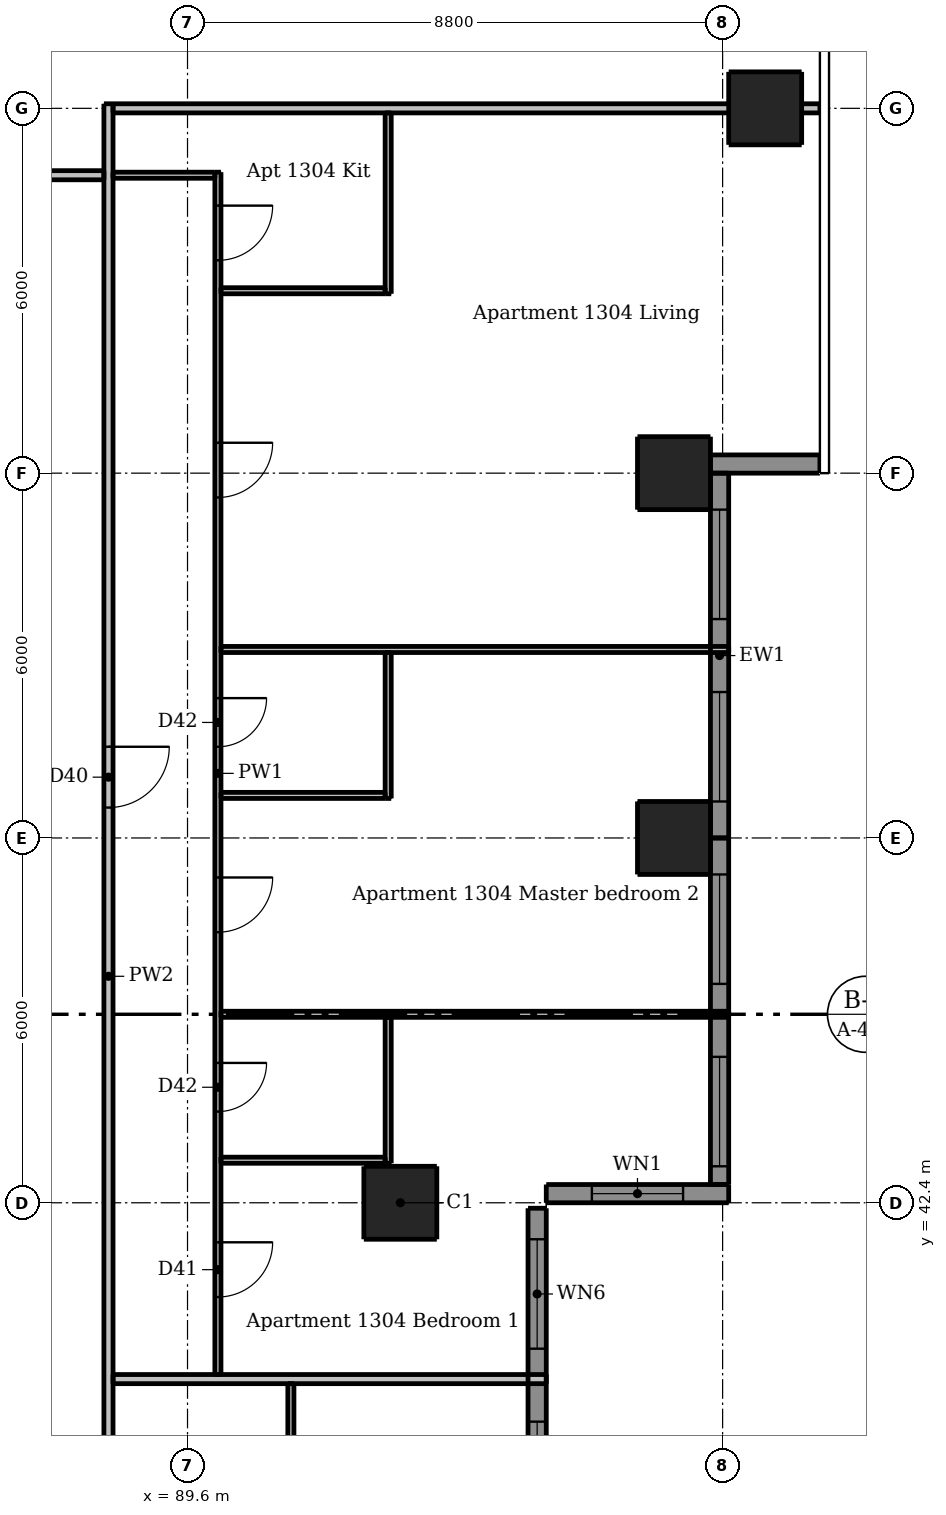
"""IFC4 building model, lengths in metres.
Left out: names, types, materials, properties, quantities, classifications, styles, units other than length and angle.
Written with IfcOpenShell. Run it as: python <this file> out.ifc"""

import sys

from ifc_helpers import new_model, si_unit, direction, frame, frame_2d, origin, origin_2d, place, context, subcontext, project, spatial, rectangle, extrude, element, fill, save


model = new_model("IFC4")
c1 = context("Model", 3, precision=1e-05, world=origin(), true_north=direction((0.0, 1.0)))
c2 = subcontext(c1, "Body", "Model", "MODEL_VIEW")
j1 = project(units=[si_unit("LENGTHUNIT", "METRE"), si_unit("PLANEANGLEUNIT", "RADIAN")], contexts=[c1])
p1 = place(None, origin())
s1 = spatial("IfcSite", under=j1, at=p1, CompositionType="ELEMENT")
p2 = place(p1, origin())
s2 = spatial("IfcBuilding", under=s1, at=p2, CompositionType="ELEMENT")
p3 = place(p2, frame((0.0, 0.0, 49.9)))
s3 = spatial("IfcBuildingStorey", under=s2, at=p3, CompositionType="ELEMENT", Elevation=49.9)
p4 = place(p3, frame((93.1, 42.4, 0.0), z_axis=(0.0, 0.0, 1.0), x_axis=(1.0, 0.0, 0.0)))
e1 = element("IfcColumn", 1, at=p4, inside=s3, PredefinedType="COLUMN", context=c2, shape_type="SweptSolid", body=[
    extrude(rectangle(XDim=1.2, YDim=1.2, at=origin_2d()), origin(), (0.0, 0.0, 1.0), 3.05),
])
p5 = place(p3, frame((97.6, 48.4, 0.0), z_axis=(0.0, 0.0, 1.0), x_axis=(1.0, 0.0, 0.0)))
e2 = element("IfcColumn", 2, at=p5, inside=s3, PredefinedType="COLUMN", context=c2, shape_type="SweptSolid", body=[
    extrude(rectangle(XDim=1.2, YDim=1.2, at=origin_2d()), origin(), (0.0, 0.0, 1.0), 3.3),
])
for number, where, z_axis, x_axis in (
    (3, (97.6, 54.4, 0.0), (0.0, 0.0, 1.0), (1.0, 0.0, 0.0)),
    (4, (99.1, 60.4, 0.0), (0.0, 0.0, 1.0), (1.0, 0.0, 0.0)),
):
    element("IfcColumn", number, at=place(p3, frame(where, z_axis=z_axis, x_axis=x_axis)), inside=s3, PredefinedType="COLUMN", context=c2, shape_type="SweptSolid", body=[
        extrude(rectangle(XDim=1.2, YDim=1.2, at=origin_2d()), origin(), (0.0, 0.0, 1.0), 3.05),
    ])
p6 = place(p3, frame((95.5, 42.55, 0.0), z_axis=(0.0, 0.0, 1.0), x_axis=(1.0, 0.0, 0.0)))
e5 = element("IfcWall", 5, at=p6, inside=s3, PredefinedType="SOLIDWALL", context=c2, shape_type="SweptSolid", body=[
    extrude(rectangle(XDim=3.0, YDim=0.3, at=frame_2d((1.5, 0.0))), origin(), (0.0, 0.0, 1.0), 3.05),
])
p7 = place(p6, frame((0.75, 0.0, 0.9)))
e6 = element("IfcOpeningElement", 6, at=p7, cuts=e5, PredefinedType="OPENING", context=c2, shape_type="SweptSolid", body=[
    extrude(rectangle(XDim=1.5, YDim=1.5, at=frame_2d((0.75, 0.75))), frame((0.0, 0.16, 0.0), z_axis=(0.0, -1.0, 0.0), x_axis=(1.0, 0.0, 0.0)), (0.0, 0.0, 1.0), 0.32),
])
p8 = place(p3, frame((98.2, 54.55, 0.0), z_axis=(0.0, 0.0, 1.0), x_axis=(1.0, 0.0, 0.0)))
e7 = element("IfcWall", 7, at=p8, inside=s3, PredefinedType="SOLIDWALL", context=c2, shape_type="SweptSolid", body=[
    extrude(rectangle(XDim=1.8, YDim=0.3, at=frame_2d((0.9, 0.0))), origin(), (0.0, 0.0, 1.0), 3.05),
])
p9 = place(p3, frame((95.35, 36.7, 0.0), z_axis=(0.0, 0.0, 1.0), x_axis=(0.0, 1.0, 0.0)))
e8 = element("IfcWall", 8, at=p9, inside=s3, PredefinedType="SOLIDWALL", context=c2, shape_type="SweptSolid", body=[
    extrude(rectangle(XDim=5.61, YDim=0.3, at=frame_2d((2.805, 0.0))), origin(), (0.0, 0.0, 1.0), 3.05),
])
p10 = place(p9, frame((0.3, 0.0, 0.15)))
e9 = element("IfcOpeningElement", 9, at=p10, cuts=e8, PredefinedType="OPENING", context=c2, shape_type="SweptSolid", body=[
    extrude(rectangle(XDim=1.8, YDim=2.1, at=frame_2d((0.9, 1.05))), frame((0.0, 0.16, 0.0), z_axis=(0.0, -1.0, 0.0), x_axis=(1.0, 0.0, 0.0)), (0.0, 0.0, 1.0), 0.32),
])
p11 = place(p9, frame((3.3, 0.0, 0.15)))
e10 = element("IfcOpeningElement", 10, at=p11, cuts=e8, PredefinedType="OPENING", context=c2, shape_type="SweptSolid", body=[
    extrude(rectangle(XDim=1.8, YDim=2.1, at=frame_2d((0.9, 1.05))), frame((0.0, 0.16, 0.0), z_axis=(0.0, -1.0, 0.0), x_axis=(1.0, 0.0, 0.0)), (0.0, 0.0, 1.0), 0.32),
])
p12 = place(p3, frame((98.35, 42.7, 0.0), z_axis=(0.0, 0.0, 1.0), x_axis=(0.0, 1.0, 0.0)))
e11 = element("IfcWall", 11, at=p12, inside=s3, PredefinedType="SOLIDWALL", context=c2, shape_type="SweptSolid", body=[
    extrude(rectangle(XDim=5.7, YDim=0.3, at=frame_2d((2.85, 0.0))), origin(), (0.0, 0.0, 1.0), 3.05),
])
p13 = place(p12, frame((0.3, 0.0, 0.15)))
e12 = element("IfcOpeningElement", 12, at=p13, cuts=e11, PredefinedType="OPENING", context=c2, shape_type="SweptSolid", body=[
    extrude(rectangle(XDim=1.8, YDim=2.1, at=frame_2d((0.9, 1.05))), frame((0.0, 0.16, 0.0), z_axis=(0.0, -1.0, 0.0), x_axis=(1.0, 0.0, 0.0)), (0.0, 0.0, 1.0), 0.32),
])
p14 = place(p12, frame((3.3, 0.0, 0.15)))
e13 = element("IfcOpeningElement", 13, at=p14, cuts=e11, PredefinedType="OPENING", context=c2, shape_type="SweptSolid", body=[
    extrude(rectangle(XDim=1.8, YDim=2.1, at=frame_2d((0.9, 1.05))), frame((0.0, 0.16, 0.0), z_axis=(0.0, -1.0, 0.0), x_axis=(1.0, 0.0, 0.0)), (0.0, 0.0, 1.0), 0.32),
])
p15 = place(p3, frame((98.35, 48.4, 0.0), z_axis=(0.0, 0.0, 1.0), x_axis=(0.0, 1.0, 0.0)))
e14 = element("IfcWall", 14, at=p15, inside=s3, PredefinedType="SOLIDWALL", context=c2, shape_type="SweptSolid", body=[
    extrude(rectangle(XDim=6.0, YDim=0.3, at=frame_2d((3.0, 0.0))), origin(), (0.0, 0.0, 1.0), 3.05),
])
p16 = place(p15, frame((0.6, 0.0, 0.15)))
e15 = element("IfcOpeningElement", 15, at=p16, cuts=e14, PredefinedType="OPENING", context=c2, shape_type="SweptSolid", body=[
    extrude(rectangle(XDim=1.8, YDim=2.1, at=frame_2d((0.9, 1.05))), frame((0.0, 0.16, 0.0), z_axis=(0.0, -1.0, 0.0), x_axis=(1.0, 0.0, 0.0)), (0.0, 0.0, 1.0), 0.32),
])
p17 = place(p15, frame((3.6, 0.0, 0.15)))
e16 = element("IfcOpeningElement", 16, at=p17, cuts=e14, PredefinedType="OPENING", context=c2, shape_type="SweptSolid", body=[
    extrude(rectangle(XDim=1.8, YDim=2.1, at=frame_2d((0.9, 1.05))), frame((0.0, 0.16, 0.0), z_axis=(0.0, -1.0, 0.0), x_axis=(1.0, 0.0, 0.0)), (0.0, 0.0, 1.0), 0.32),
])
p18 = place(p3, frame((90.1, 59.35, 0.0), z_axis=(0.0, 0.0, 1.0), x_axis=(0.0, -1.0, 0.0)))
e17 = element("IfcWall", 17, at=p18, inside=s3, PredefinedType="PARTITIONING", context=c2, shape_type="SweptSolid", body=[
    extrude(rectangle(XDim=19.775, YDim=0.1, at=frame_2d((9.888, 0.0))), origin(), (0.0, 0.0, 1.0), 3.05),
])
p19 = place(p18, frame((4.45, 0.0, 0.0)))
e18 = element("IfcOpeningElement", 18, at=p19, cuts=e17, PredefinedType="OPENING", context=c2, shape_type="SweptSolid", body=[
    extrude(rectangle(XDim=0.9, YDim=2.1, at=frame_2d((0.45, 1.05))), frame((0.0, 0.06, 0.0), z_axis=(0.0, -1.0, 0.0), x_axis=(1.0, 0.0, 0.0)), (0.0, 0.0, 1.0), 0.12),
])
p20 = place(p18, frame((0.55, 0.0, 0.0)))
e19 = element("IfcOpeningElement", 19, at=p20, cuts=e17, PredefinedType="OPENING", context=c2, shape_type="SweptSolid", body=[
    extrude(rectangle(XDim=0.9, YDim=2.1, at=frame_2d((0.45, 1.05))), frame((0.0, 0.06, 0.0), z_axis=(0.0, -1.0, 0.0), x_axis=(1.0, 0.0, 0.0)), (0.0, 0.0, 1.0), 0.12),
])
p21 = place(p18, frame((17.6, 0.0, 0.0)))
e20 = element("IfcOpeningElement", 20, at=p21, cuts=e17, PredefinedType="OPENING", context=c2, shape_type="SweptSolid", body=[
    extrude(rectangle(XDim=0.9, YDim=2.1, at=frame_2d((0.45, 1.05))), frame((0.0, 0.06, 0.0), z_axis=(0.0, -1.0, 0.0), x_axis=(1.0, 0.0, 0.0)), (0.0, 0.0, 1.0), 0.12),
])
p22 = place(p18, frame((11.6, 0.0, 0.0)))
e21 = element("IfcOpeningElement", 21, at=p22, cuts=e17, PredefinedType="OPENING", context=c2, shape_type="SweptSolid", body=[
    extrude(rectangle(XDim=0.9, YDim=2.1, at=frame_2d((0.45, 1.05))), frame((0.0, 0.06, 0.0), z_axis=(0.0, -1.0, 0.0), x_axis=(1.0, 0.0, 0.0)), (0.0, 0.0, 1.0), 0.12),
])
p23 = place(p18, frame((14.65, 0.0, 0.0)))
e22 = element("IfcOpeningElement", 22, at=p23, cuts=e17, PredefinedType="OPENING", context=c2, shape_type="SweptSolid", body=[
    extrude(rectangle(XDim=0.8, YDim=2.1, at=frame_2d((0.4, 1.05))), frame((0.0, 0.06, 0.0), z_axis=(0.0, -1.0, 0.0), x_axis=(1.0, 0.0, 0.0)), (0.0, 0.0, 1.0), 0.12),
])
p24 = place(p18, frame((8.65, 0.0, 0.0)))
e23 = element("IfcOpeningElement", 23, at=p24, cuts=e17, PredefinedType="OPENING", context=c2, shape_type="SweptSolid", body=[
    extrude(rectangle(XDim=0.8, YDim=2.1, at=frame_2d((0.4, 1.05))), frame((0.0, 0.06, 0.0), z_axis=(0.0, -1.0, 0.0), x_axis=(1.0, 0.0, 0.0)), (0.0, 0.0, 1.0), 0.12),
])
p25 = place(p3, frame((91.3, 33.45, 0.0), z_axis=(0.0, 0.0, 1.0), x_axis=(0.0, 1.0, 0.0)))
e24 = element("IfcWall", 24, at=p25, inside=s3, PredefinedType="PARTITIONING", context=c2, shape_type="SweptSolid", body=[
    extrude(rectangle(XDim=5.975, YDim=0.1, at=frame_2d((2.988, 0.0))), origin(), (0.0, 0.0, 1.0), 3.05),
])
p26 = place(p25, frame((3.8, 0.0, 0.0)))
e25 = element("IfcOpeningElement", 25, at=p26, cuts=e24, PredefinedType="OPENING", context=c2, shape_type="SweptSolid", body=[
    extrude(rectangle(XDim=0.8, YDim=2.1, at=frame_2d((0.4, 1.05))), frame((0.0, 0.06, 0.0), z_axis=(0.0, -1.0, 0.0), x_axis=(1.0, 0.0, 0.0)), (0.0, 0.0, 1.0), 0.12),
])
for number, where, z_axis, x_axis in (
    (26, (92.9, 43.05, 0.0), (0.0, 0.0, 1.0), (0.0, 1.0, 0.0)),
    (27, (92.9, 49.05, 0.0), (0.0, 0.0, 1.0), (0.0, 1.0, 0.0)),
):
    element("IfcWall", number, at=place(p3, frame(where, z_axis=z_axis, x_axis=x_axis)), inside=s3, PredefinedType="PARTITIONING", context=c2, shape_type="SweptSolid", body=[
        extrude(rectangle(XDim=2.4, YDim=0.1, at=frame_2d((1.2, 0.0))), origin(), (0.0, 0.0, 1.0), 3.05),
    ])
p27 = place(p3, frame((92.9, 57.35, 0.0), z_axis=(0.0, 0.0, 1.0), x_axis=(0.0, 1.0, 0.0)))
e28 = element("IfcWall", 28, at=p27, inside=s3, PredefinedType="PARTITIONING", context=c2, shape_type="SweptSolid", body=[
    extrude(rectangle(XDim=2.975, YDim=0.1, at=frame_2d((1.487, 0.0))), origin(), (0.0, 0.0, 1.0), 3.05),
])
p28 = place(p3, frame((88.375, 59.3, 0.0), z_axis=(0.0, 0.0, 1.0), x_axis=(1.0, 0.0, 0.0)))
e29 = element("IfcWall", 29, at=p28, inside=s3, PredefinedType="PARTITIONING", context=c2, shape_type="SweptSolid", body=[
    extrude(rectangle(XDim=1.675, YDim=0.1, at=frame_2d((0.837, 0.0))), origin(), (0.0, 0.0, 1.0), 3.05),
])
p29 = place(p3, frame((90.15, 57.4, 0.0), z_axis=(0.0, 0.0, 1.0), x_axis=(1.0, 0.0, 0.0)))
e30 = element("IfcWall", 30, at=p29, inside=s3, PredefinedType="PARTITIONING", context=c2, shape_type="SweptSolid", body=[
    extrude(rectangle(XDim=2.7, YDim=0.1, at=frame_2d((1.35, 0.0))), origin(), (0.0, 0.0, 1.0), 3.05),
])
p30 = place(p3, frame((90.15, 51.5, 0.0), z_axis=(0.0, 0.0, 1.0), x_axis=(1.0, 0.0, 0.0)))
e31 = element("IfcWall", 31, at=p30, inside=s3, PredefinedType="PARTITIONING", context=c2, shape_type="SweptSolid", body=[
    extrude(rectangle(XDim=8.35, YDim=0.1, at=frame_2d((4.175, 0.0))), origin(), (0.0, 0.0, 1.0), 3.05),
])
p31 = place(p3, frame((90.15, 49.1, 0.0), z_axis=(0.0, 0.0, 1.0), x_axis=(1.0, 0.0, 0.0)))
e32 = element("IfcWall", 32, at=p31, inside=s3, PredefinedType="PARTITIONING", context=c2, shape_type="SweptSolid", body=[
    extrude(rectangle(XDim=2.7, YDim=0.1, at=frame_2d((1.35, 0.0))), origin(), (0.0, 0.0, 1.0), 3.05),
])
p32 = place(p3, frame((90.15, 45.5, 0.0), z_axis=(0.0, 0.0, 1.0), x_axis=(1.0, 0.0, 0.0)))
e33 = element("IfcWall", 33, at=p32, inside=s3, PredefinedType="PARTITIONING", context=c2, shape_type="SweptSolid", body=[
    extrude(rectangle(XDim=8.35, YDim=0.1, at=frame_2d((4.175, 0.0))), origin(), (0.0, 0.0, 1.0), 3.05),
])
p33 = place(p3, frame((90.15, 43.1, 0.0), z_axis=(0.0, 0.0, 1.0), x_axis=(1.0, 0.0, 0.0)))
e34 = element("IfcWall", 34, at=p33, inside=s3, PredefinedType="PARTITIONING", context=c2, shape_type="SweptSolid", body=[
    extrude(rectangle(XDim=2.7, YDim=0.1, at=frame_2d((1.35, 0.0))), origin(), (0.0, 0.0, 1.0), 3.05),
])
p34 = place(p3, frame((88.3, 60.475, 0.0), z_axis=(0.0, 0.0, 1.0), x_axis=(0.0, -1.0, 0.0)))
e35 = element("IfcWall", 35, at=p34, inside=s3, PredefinedType="PARTITIONING", context=c2, shape_type="SweptSolid", body=[
    extrude(rectangle(XDim=28.7, YDim=0.15, at=frame_2d((14.35, 0.0))), origin(), (0.0, 0.0, 1.0), 3.05),
])
p35 = place(p34, frame((27.425, 0.0, 0.0)))
e36 = element("IfcOpeningElement", 36, at=p35, cuts=e35, PredefinedType="OPENING", context=c2, shape_type="SweptSolid", body=[
    extrude(rectangle(XDim=1.0, YDim=2.1, at=frame_2d((0.5, 1.05))), frame((0.0, 0.085, 0.0), z_axis=(0.0, -1.0, 0.0), x_axis=(1.0, 0.0, 0.0)), (0.0, 0.0, 1.0), 0.17),
])
p36 = place(p34, frame((10.575, 0.0, 0.0)))
e37 = element("IfcOpeningElement", 37, at=p36, cuts=e35, PredefinedType="OPENING", context=c2, shape_type="SweptSolid", body=[
    extrude(rectangle(XDim=1.0, YDim=2.1, at=frame_2d((0.5, 1.05))), frame((0.0, 0.085, 0.0), z_axis=(0.0, -1.0, 0.0), x_axis=(1.0, 0.0, 0.0)), (0.0, 0.0, 1.0), 0.17),
])
p37 = place(p3, frame((88.375, 60.4, 0.0), z_axis=(0.0, 0.0, 1.0), x_axis=(1.0, 0.0, 0.0)))
e38 = element("IfcWall", 38, at=p37, inside=s3, PredefinedType="PARTITIONING", context=c2, shape_type="SweptSolid", body=[
    extrude(rectangle(XDim=11.625, YDim=0.15, at=frame_2d((5.812, 0.0))), origin(), (0.0, 0.0, 1.0), 2.516),
])
p38 = place(p3, frame((59.675, 59.3, 0.0), z_axis=(0.0, 0.0, 1.0), x_axis=(1.0, 0.0, 0.0)))
e39 = element("IfcWall", 39, at=p38, inside=s3, PredefinedType="PARTITIONING", context=c2, shape_type="SweptSolid", body=[
    extrude(rectangle(XDim=28.55, YDim=0.15, at=frame_2d((14.275, 0.0))), origin(), (0.0, 0.0, 1.0), 3.05),
])
p39 = place(p38, frame((8.975, 0.0, 0.0)))
e40 = element("IfcOpeningElement", 40, at=p39, cuts=e39, PredefinedType="OPENING", context=c2, shape_type="SweptSolid", body=[
    extrude(rectangle(XDim=1.0, YDim=2.1, at=frame_2d((0.5, 1.05))), frame((0.0, 0.085, 0.0), z_axis=(0.0, -1.0, 0.0), x_axis=(1.0, 0.0, 0.0)), (0.0, 0.0, 1.0), 0.17),
])
p40 = place(p38, frame((25.775, 0.0, 0.0)))
e41 = element("IfcOpeningElement", 41, at=p40, cuts=e39, PredefinedType="OPENING", context=c2, shape_type="SweptSolid", body=[
    extrude(rectangle(XDim=1.0, YDim=2.1, at=frame_2d((0.5, 1.05))), frame((0.0, 0.085, 0.0), z_axis=(0.0, -1.0, 0.0), x_axis=(1.0, 0.0, 0.0)), (0.0, 0.0, 1.0), 0.17),
])
p41 = place(p3, frame((88.375, 39.5, 0.0), z_axis=(0.0, 0.0, 1.0), x_axis=(1.0, 0.0, 0.0)))
e42 = element("IfcWall", 42, at=p41, inside=s3, PredefinedType="PARTITIONING", context=c2, shape_type="SweptSolid", body=[
    extrude(rectangle(XDim=7.125, YDim=0.15, at=frame_2d((3.562, 0.0))), origin(), (0.0, 0.0, 1.0), 3.05),
])
p42 = place(p7, origin())
e43 = element("IfcWindow", 43, at=p42, inside=s3, PartitioningType="DOUBLE_PANEL_VERTICAL", PredefinedType="WINDOW", context=c2, shape_type="SweptSolid", body=[
    extrude(rectangle(XDim=1.5, YDim=1.5, at=frame_2d((0.75, 0.75))), frame((0.0, 0.03, 0.0), z_axis=(0.0, -1.0, 0.0), x_axis=(1.0, 0.0, 0.0)), (0.0, 0.0, 1.0), 0.06),
])
fill(e6, e43)
p43 = place(p10, origin())
e44 = element("IfcWindow", 44, at=p43, inside=s3, PartitioningType="DOUBLE_PANEL_VERTICAL", PredefinedType="WINDOW", context=c2, shape_type="SweptSolid", body=[
    extrude(rectangle(XDim=1.8, YDim=2.1, at=frame_2d((0.9, 1.05))), frame((0.0, 0.03, 0.0), z_axis=(0.0, -1.0, 0.0), x_axis=(1.0, 0.0, 0.0)), (0.0, 0.0, 1.0), 0.06),
])
fill(e9, e44)
p44 = place(p11, origin())
e45 = element("IfcWindow", 45, at=p44, inside=s3, PartitioningType="DOUBLE_PANEL_VERTICAL", PredefinedType="WINDOW", context=c2, shape_type="SweptSolid", body=[
    extrude(rectangle(XDim=1.8, YDim=2.1, at=frame_2d((0.9, 1.05))), frame((0.0, 0.03, 0.0), z_axis=(0.0, -1.0, 0.0), x_axis=(1.0, 0.0, 0.0)), (0.0, 0.0, 1.0), 0.06),
])
fill(e10, e45)
p45 = place(p13, origin())
e46 = element("IfcWindow", 46, at=p45, inside=s3, PartitioningType="DOUBLE_PANEL_VERTICAL", PredefinedType="WINDOW", context=c2, shape_type="SweptSolid", body=[
    extrude(rectangle(XDim=1.8, YDim=2.1, at=frame_2d((0.9, 1.05))), frame((0.0, 0.03, 0.0), z_axis=(0.0, -1.0, 0.0), x_axis=(1.0, 0.0, 0.0)), (0.0, 0.0, 1.0), 0.06),
])
fill(e12, e46)
p46 = place(p14, origin())
e47 = element("IfcWindow", 47, at=p46, inside=s3, PartitioningType="DOUBLE_PANEL_VERTICAL", PredefinedType="WINDOW", context=c2, shape_type="SweptSolid", body=[
    extrude(rectangle(XDim=1.8, YDim=2.1, at=frame_2d((0.9, 1.05))), frame((0.0, 0.03, 0.0), z_axis=(0.0, -1.0, 0.0), x_axis=(1.0, 0.0, 0.0)), (0.0, 0.0, 1.0), 0.06),
])
fill(e13, e47)
p47 = place(p16, origin())
e48 = element("IfcWindow", 48, at=p47, inside=s3, PartitioningType="DOUBLE_PANEL_VERTICAL", PredefinedType="WINDOW", context=c2, shape_type="SweptSolid", body=[
    extrude(rectangle(XDim=1.8, YDim=2.1, at=frame_2d((0.9, 1.05))), frame((0.0, 0.03, 0.0), z_axis=(0.0, -1.0, 0.0), x_axis=(1.0, 0.0, 0.0)), (0.0, 0.0, 1.0), 0.06),
])
fill(e15, e48)
p48 = place(p17, origin())
e49 = element("IfcWindow", 49, at=p48, inside=s3, PartitioningType="DOUBLE_PANEL_VERTICAL", PredefinedType="WINDOW", context=c2, shape_type="SweptSolid", body=[
    extrude(rectangle(XDim=1.8, YDim=2.1, at=frame_2d((0.9, 1.05))), frame((0.0, 0.03, 0.0), z_axis=(0.0, -1.0, 0.0), x_axis=(1.0, 0.0, 0.0)), (0.0, 0.0, 1.0), 0.06),
])
fill(e16, e49)
p49 = place(p36, origin())
e50 = element("IfcDoor", 50, at=p49, inside=s3, OperationType="SINGLE_SWING_LEFT", PredefinedType="DOOR", context=c2, shape_type="SweptSolid", body=[
    extrude(rectangle(XDim=1.0, YDim=2.1, at=frame_2d((0.5, 1.05))), frame((0.0, 0.025, 0.0), z_axis=(0.0, -1.0, 0.0), x_axis=(1.0, 0.0, 0.0)), (0.0, 0.0, 1.0), 0.05),
])
fill(e37, e50)
p50 = place(p19, origin())
e51 = element("IfcDoor", 51, at=p50, inside=s3, OperationType="SINGLE_SWING_LEFT", PredefinedType="DOOR", context=c2, shape_type="SweptSolid", body=[
    extrude(rectangle(XDim=0.9, YDim=2.1, at=frame_2d((0.45, 1.05))), frame((0.0, 0.025, 0.0), z_axis=(0.0, -1.0, 0.0), x_axis=(1.0, 0.0, 0.0)), (0.0, 0.0, 1.0), 0.05),
])
fill(e18, e51)
p51 = place(p20, origin())
e52 = element("IfcDoor", 52, at=p51, inside=s3, OperationType="SINGLE_SWING_LEFT", PredefinedType="DOOR", context=c2, shape_type="SweptSolid", body=[
    extrude(rectangle(XDim=0.9, YDim=2.1, at=frame_2d((0.45, 1.05))), frame((0.0, 0.025, 0.0), z_axis=(0.0, -1.0, 0.0), x_axis=(1.0, 0.0, 0.0)), (0.0, 0.0, 1.0), 0.05),
])
fill(e19, e52)
p52 = place(p21, origin())
e53 = element("IfcDoor", 53, at=p52, inside=s3, OperationType="SINGLE_SWING_LEFT", PredefinedType="DOOR", context=c2, shape_type="SweptSolid", body=[
    extrude(rectangle(XDim=0.9, YDim=2.1, at=frame_2d((0.45, 1.05))), frame((0.0, 0.025, 0.0), z_axis=(0.0, -1.0, 0.0), x_axis=(1.0, 0.0, 0.0)), (0.0, 0.0, 1.0), 0.05),
])
fill(e20, e53)
p53 = place(p22, origin())
e54 = element("IfcDoor", 54, at=p53, inside=s3, OperationType="SINGLE_SWING_LEFT", PredefinedType="DOOR", context=c2, shape_type="SweptSolid", body=[
    extrude(rectangle(XDim=0.9, YDim=2.1, at=frame_2d((0.45, 1.05))), frame((0.0, 0.025, 0.0), z_axis=(0.0, -1.0, 0.0), x_axis=(1.0, 0.0, 0.0)), (0.0, 0.0, 1.0), 0.05),
])
fill(e21, e54)
p54 = place(p23, origin())
e55 = element("IfcDoor", 55, at=p54, inside=s3, OperationType="SINGLE_SWING_LEFT", PredefinedType="DOOR", context=c2, shape_type="SweptSolid", body=[
    extrude(rectangle(XDim=0.8, YDim=2.1, at=frame_2d((0.4, 1.05))), frame((0.0, 0.025, 0.0), z_axis=(0.0, -1.0, 0.0), x_axis=(1.0, 0.0, 0.0)), (0.0, 0.0, 1.0), 0.05),
])
fill(e22, e55)
p55 = place(p24, origin())
e56 = element("IfcDoor", 56, at=p55, inside=s3, OperationType="SINGLE_SWING_LEFT", PredefinedType="DOOR", context=c2, shape_type="SweptSolid", body=[
    extrude(rectangle(XDim=0.8, YDim=2.1, at=frame_2d((0.4, 1.05))), frame((0.0, 0.025, 0.0), z_axis=(0.0, -1.0, 0.0), x_axis=(1.0, 0.0, 0.0)), (0.0, 0.0, 1.0), 0.05),
])
fill(e23, e56)
save(model, sys.argv[1])
